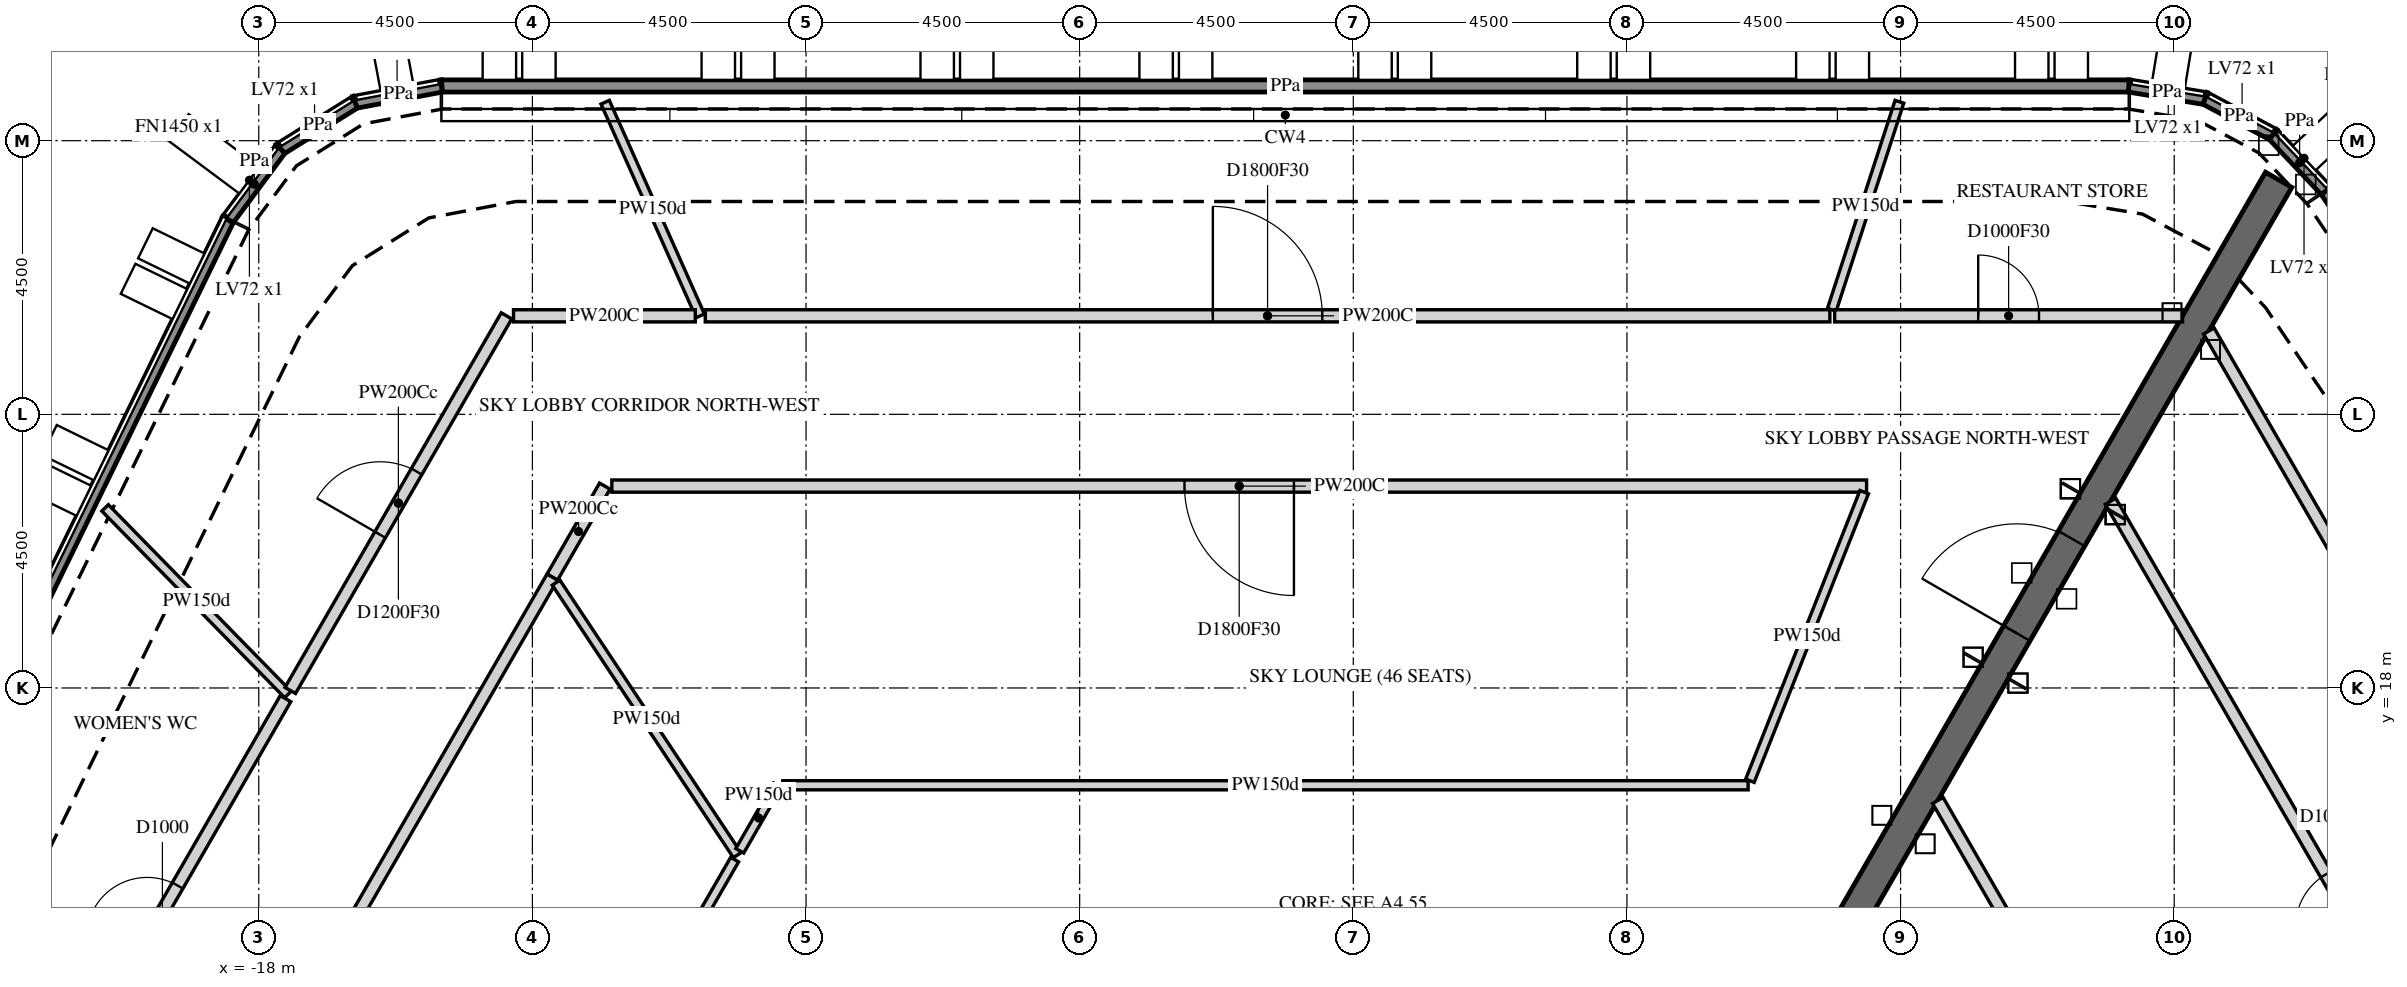
"""IFC4 building model, lengths in metres.
Left out: names, types, materials, properties, quantities, classifications, styles, units other than length and angle.
Written with IfcOpenShell. Run it as: python <this file> out.ifc"""

import sys

from ifc_helpers import new_model, si_unit, direction, frame, frame_2d, origin, place, context, subcontext, project, spatial, polyline, rectangle, outline, extrude, element, fill, save


model = new_model("IFC4")
c1 = context("Model", 3, precision=1e-05, world=origin(), true_north=direction((0.0, 1.0)))
c2 = subcontext(c1, "Body", "Model", "MODEL_VIEW")
j1 = project(units=[si_unit("LENGTHUNIT", "METRE"), si_unit("PLANEANGLEUNIT", "RADIAN")], contexts=[c1])
p1 = place(None, origin())
s1 = spatial("IfcSite", under=j1, at=p1, CompositionType="ELEMENT")
p2 = place(p1, origin())
s2 = spatial("IfcBuilding", under=s1, at=p2, CompositionType="ELEMENT")
p3 = place(p2, frame((0.0, 0.0, 250.2)))
s3 = spatial("IfcBuildingStorey", under=s2, at=p3, CompositionType="ELEMENT", Elevation=250.2)
p4 = place(p3, frame((12.753, 27.9, 5.7), z_axis=(0.0, 0.0, 1.0), x_axis=(0.9867748983, -0.162096576412, 0.0)))
e1 = element("IfcWall", 1, at=p4, inside=s3, PredefinedType="PARAPET", context=c2, shape_type="SweptSolid", body=[
    extrude(outline(polyline([(0.008, -0.1), (1.256, -0.1), (1.289, 0.1), (-0.008, 0.1), (0.008, -0.1)])), origin(), (0.0, 0.0, 1.0), 1.1),
])
p5 = place(p3, frame((14.009, 27.694, 5.7), z_axis=(0.0, 0.0, 1.0), x_axis=(0.882950708751, -0.469465702598, 0.0)))
e2 = element("IfcWall", 2, at=p5, inside=s3, PredefinedType="PARAPET", context=c2, shape_type="SweptSolid", body=[
    extrude(outline(polyline([(0.016, -0.1), (1.248, -0.1), (1.281, 0.1), (-0.016, 0.1), (0.016, -0.1)])), origin(), (0.0, 0.0, 1.0), 1.1),
])
p6 = place(p3, frame((15.125, 27.1, 5.7), z_axis=(0.0, 0.0, 1.0), x_axis=(0.686184039693, -0.727427978339, 0.0)))
e3 = element("IfcWall", 3, at=p6, inside=s3, PredefinedType="PARAPET", context=c2, shape_type="SweptSolid", body=[
    extrude(outline(polyline([(0.016, -0.1), (1.265, -0.1), (1.281, 0.1), (-0.016, 0.1), (0.016, -0.1)])), origin(), (0.0, 0.0, 1.0), 1.1),
])
p7 = place(p3, frame((15.999, 26.174, 5.7), z_axis=(0.0, 0.0, 1.0), x_axis=(0.559192735444, -0.82903768589, 0.0)))
e4 = element("IfcWall", 4, at=p7, inside=s3, PredefinedType="PARAPET", context=c2, shape_type="SweptSolid", body=[
    extrude(outline(polyline([(0.008, -0.1), (27.731, -0.1), (27.75, 0.1), (-0.008, 0.1), (0.008, -0.1)])), origin(), (0.0, 0.0, 1.0), 1.1),
])
p8 = place(p3, frame((-30.667, 0.768, 5.7), z_axis=(0.0, 0.0, 1.0), x_axis=(0.43836623679, 0.898796441049, 0.0)))
e5 = element("IfcWall", 5, at=p8, inside=s3, PredefinedType="PARAPET", context=c2, shape_type="SweptSolid", body=[
    extrude(outline(polyline([(0.008, -0.1), (27.731, -0.1), (27.75, 0.1), (-0.008, 0.1), (0.008, -0.1)])), origin(), (0.0, 0.0, 1.0), 1.1),
])
p9 = place(p3, frame((-18.506, 25.701, 5.7), z_axis=(0.0, 0.0, 1.0), x_axis=(0.597118923952, 0.802152722777, 0.0)))
e6 = element("IfcWall", 6, at=p9, inside=s3, PredefinedType="PARAPET", context=c2, shape_type="SweptSolid", body=[
    extrude(outline(polyline([(0.009, -0.1), (1.434, -0.1), (1.471, 0.1), (-0.009, 0.1), (0.009, -0.1)])), origin(), (0.0, 0.0, 1.0), 1.1),
])
p10 = place(p3, frame((-17.639, 26.866, 5.7), z_axis=(0.0, 0.0, 1.0), x_axis=(0.848083831846, 0.529862070884, 0.0)))
e7 = element("IfcWall", 7, at=p10, inside=s3, PredefinedType="PARAPET", context=c2, shape_type="SweptSolid", body=[
    extrude(outline(polyline([(0.019, -0.1), (1.424, -0.1), (1.462, 0.1), (-0.019, 0.1), (0.019, -0.1)])), origin(), (0.0, 0.0, 1.0), 1.1),
])
p11 = place(p3, frame((-16.415, 27.631, 5.7), z_axis=(0.0, 0.0, 1.0), x_axis=(0.982729187844, 0.185049570005, 0.0)))
e8 = element("IfcWall", 8, at=p11, inside=s3, PredefinedType="PARAPET", context=c2, shape_type="SweptSolid", body=[
    extrude(outline(polyline([(0.019, -0.1), (1.443, -0.1), (1.462, 0.1), (-0.019, 0.1), (0.019, -0.1)])), origin(), (0.0, 0.0, 1.0), 1.1),
])
p12 = place(p3, frame((-14.988, 27.9, 5.7), z_axis=(0.0, 0.0, 1.0), x_axis=(1.0, 0.0, 0.0)))
e9 = element("IfcWall", 9, at=p12, inside=s3, PredefinedType="PARAPET", context=c2, shape_type="SweptSolid", body=[
    extrude(outline(polyline([(0.009, -0.1), (27.732, -0.1), (27.749, 0.1), (-0.009, 0.1), (0.009, -0.1)])), origin(), (0.0, 0.0, 1.0), 1.1),
])
p13 = place(p3, frame((7.506, 13.0, -0.3), z_axis=(0.0, 0.0, 1.0), x_axis=(0.499988271576, 0.866032175087, 0.0)))
e10 = element("IfcWall", 10, at=p13, inside=s3, PredefinedType="SHEAR", context=c2, shape_type="SweptSolid", body=[
    extrude(rectangle(XDim=15.424, YDim=0.5, at=frame_2d((7.712, 0.0))), origin(), (0.0, 0.0, 1.0), 5.8),
])
p14 = place(p13, frame((6.812, 0.0, 0.3)))
e11 = element("IfcOpeningElement", 11, at=p14, cuts=e10, PredefinedType="OPENING", context=c2, shape_type="SweptSolid", body=[
    extrude(rectangle(XDim=1.8, YDim=2.4, at=frame_2d((0.9, 1.2))), frame((0.0, 0.26, 0.0), z_axis=(0.0, -1.0, 0.0), x_axis=(1.0, 0.0, 0.0)), (0.0, 0.0, 1.0), 0.52),
])
p15 = place(p3, frame((-13.172, 19.825, 0.0), z_axis=(0.0, 0.0, 1.0), x_axis=(-0.499999503755, -0.866025690291, 0.0)))
e12 = element("IfcWall", 12, at=p15, inside=s3, PredefinedType="PARTITIONING", context=c2, shape_type="SweptSolid", body=[
    extrude(rectangle(XDim=18.943, YDim=0.2, at=frame_2d((9.471, 0.0))), origin(), (0.0, 0.0, 1.0), 5.5),
])
p16 = place(p15, frame((8.572, 0.0, 0.0)))
e13 = element("IfcOpeningElement", 13, at=p16, cuts=e12, PredefinedType="OPENING", context=c2, shape_type="SweptSolid", body=[
    extrude(rectangle(XDim=1.8, YDim=2.1, at=frame_2d((0.9, 1.05))), frame((0.0, 0.11, 0.0), z_axis=(0.0, -1.0, 0.0), x_axis=(1.0, 0.0, 0.0)), (0.0, 0.0, 1.0), 0.22),
])
p17 = place(p3, frame((-20.527, 20.962, 0.0), z_axis=(0.0, 0.0, 1.0), x_axis=(0.699623583843, -0.714511610074, 0.0)))
e14 = element("IfcWall", 14, at=p17, inside=s3, PredefinedType="PARTITIONING", context=c2, shape_type="SweptSolid", body=[
    extrude(rectangle(XDim=4.296, YDim=0.15, at=frame_2d((2.148, 0.0))), origin(), (0.0, 0.0, 1.0), 5.5),
])
p18 = place(p3, frame((-21.609, 10.811, 0.0), z_axis=(0.0, 0.0, 1.0), x_axis=(0.500032982845, 0.866006360293, 0.0)))
e15 = element("IfcWall", 15, at=p18, inside=s3, PredefinedType="PARTITIONING", context=c2, shape_type="SweptSolid", body=[
    extrude(rectangle(XDim=8.099, YDim=0.2, at=frame_2d((4.049, 0.0))), origin(), (0.0, 0.0, 1.0), 5.5),
])
p19 = place(p18, frame((3.549, 0.0, 0.0)))
e16 = element("IfcOpeningElement", 16, at=p19, cuts=e15, PredefinedType="OPENING", context=c2, shape_type="SweptSolid", body=[
    extrude(rectangle(XDim=1.0, YDim=2.1, at=frame_2d((0.5, 1.05))), frame((0.0, 0.11, 0.0), z_axis=(0.0, -1.0, 0.0), x_axis=(1.0, 0.0, 0.0)), (0.0, 0.0, 1.0), 0.22),
])
p20 = place(p3, frame((-17.482, 17.959, 0.0), z_axis=(0.0, 0.0, 1.0), x_axis=(0.499926463787, 0.866067855774, 0.0)))
e17 = element("IfcWall", 17, at=p20, inside=s3, PredefinedType="PARTITIONING", context=c2, shape_type="SweptSolid", body=[
    extrude(rectangle(XDim=7.113, YDim=0.2, at=frame_2d((3.557, 0.0))), origin(), (0.0, 0.0, 1.0), 4.573),
])
p21 = place(p20, frame((2.957, 0.0, 0.0)))
e18 = element("IfcOpeningElement", 18, at=p21, cuts=e17, PredefinedType="OPENING", context=c2, shape_type="SweptSolid", body=[
    extrude(rectangle(XDim=1.2, YDim=2.1, at=frame_2d((0.6, 1.05))), frame((0.0, 0.11, 0.0), z_axis=(0.0, -1.0, 0.0), x_axis=(1.0, 0.0, 0.0)), (0.0, 0.0, 1.0), 0.22),
])
p22 = place(p3, frame((-13.172, 19.825, 0.0), z_axis=(0.0, 0.0, 1.0), x_axis=(0.49992648901, 0.866067841215, 0.0)))
e19 = element("IfcWall", 19, at=p22, inside=s3, PredefinedType="PARTITIONING", context=c2, shape_type="SweptSolid", body=[
    extrude(rectangle(XDim=1.726, YDim=0.2, at=frame_2d((0.863, 0.0))), origin(), (0.0, 0.0, 1.0), 4.573),
])
p23 = place(p3, frame((-13.11, 19.732, 0.0), z_axis=(0.0, 0.0, 1.0), x_axis=(0.553422205017, -0.83290087225, 0.0)))
e20 = element("IfcWall", 20, at=p23, inside=s3, PredefinedType="PARTITIONING", context=c2, shape_type="SweptSolid", body=[
    extrude(rectangle(XDim=5.381, YDim=0.15, at=frame_2d((2.69, 0.0))), origin(), (0.0, 0.0, 1.0), 5.5),
])
p24 = place(p3, frame((8.441, 21.32, 0.0), z_axis=(0.0, 0.0, 1.0), x_axis=(-1.0, 0.0, 0.0)))
e21 = element("IfcWall", 21, at=p24, inside=s3, PredefinedType="PARTITIONING", context=c2, shape_type="SweptSolid", body=[
    extrude(rectangle(XDim=20.635, YDim=0.2, at=frame_2d((10.317, 0.0))), origin(), (0.0, 0.0, 1.0), 5.5),
])
p25 = place(p24, frame((9.417, 0.0, 0.0)))
e22 = element("IfcOpeningElement", 22, at=p25, cuts=e21, PredefinedType="OPENING", context=c2, shape_type="SweptSolid", body=[
    extrude(rectangle(XDim=1.8, YDim=2.1, at=frame_2d((0.9, 1.05))), frame((0.0, 0.11, 0.0), z_axis=(0.0, -1.0, 0.0), x_axis=(1.0, 0.0, 0.0)), (0.0, 0.0, 1.0), 0.22),
])
p26 = place(p3, frame((-12.303, 27.633, 0.0), z_axis=(0.0, 0.0, 1.0), x_axis=(0.406845245806, -0.913497096856, 0.0)))
e23 = element("IfcWall", 23, at=p26, inside=s3, PredefinedType="PARTITIONING", context=c2, shape_type="SweptSolid", body=[
    extrude(rectangle(XDim=3.845, YDim=0.15, at=frame_2d((1.923, 0.0))), origin(), (0.0, 0.0, 1.0), 5.5),
])
p27 = place(p3, frame((-10.821, 24.12, 0.0), z_axis=(0.0, 0.0, 1.0), x_axis=(-1.0, 0.0, 0.0)))
e24 = element("IfcWall", 24, at=p27, inside=s3, PredefinedType="PARTITIONING", context=c2, shape_type="SweptSolid", body=[
    extrude(rectangle(XDim=2.99, YDim=0.2, at=frame_2d((1.495, 0.0))), origin(), (0.0, 0.0, 1.0), 5.5),
])
p28 = place(p3, frame((-10.174, 15.177, 0.0), z_axis=(0.0, 0.0, 1.0), x_axis=(-0.500018949701, -0.866014462893, 0.0)))
e25 = element("IfcWall", 25, at=p28, inside=s3, PredefinedType="PARTITIONING", context=c2, shape_type="SweptSolid", body=[
    extrude(rectangle(XDim=14.469, YDim=0.15, at=frame_2d((7.235, 0.0))), origin(), (0.0, 0.0, 1.0), 5.5),
])
p29 = place(p3, frame((-9.469, 16.4, 0.0), z_axis=(0.0, 0.0, 1.0), x_axis=(-0.499433504563, -0.866352223128, 0.0)))
e26 = element("IfcWall", 26, at=p29, inside=s3, PredefinedType="PARTITIONING", context=c2, shape_type="SweptSolid", body=[
    extrude(rectangle(XDim=1.244, YDim=0.15, at=frame_2d((0.622, 0.0))), origin(), (0.0, 0.0, 1.0), 5.5),
])
p30 = place(p3, frame((6.493, 16.4, 0.0), z_axis=(0.0, 0.0, 1.0), x_axis=(-1.0, 0.0, 0.0)))
e27 = element("IfcWall", 27, at=p30, inside=s3, PredefinedType="PARTITIONING", context=c2, shape_type="SweptSolid", body=[
    extrude(rectangle(XDim=15.875, YDim=0.15, at=frame_2d((7.938, 0.0))), origin(), (0.0, 0.0, 1.0), 5.5),
])
p31 = place(p3, frame((-10.657, 24.12, 0.0), z_axis=(0.0, 0.0, 1.0), x_axis=(1.0, 0.0, 0.0)))
e28 = element("IfcWall", 28, at=p31, inside=s3, PredefinedType="PARTITIONING", context=c2, shape_type="SweptSolid", body=[
    extrude(rectangle(XDim=18.494, YDim=0.2, at=frame_2d((9.247, 0.0))), origin(), (0.0, 0.0, 1.0), 5.5),
])
p32 = place(p31, frame((8.347, 0.0, 0.0)))
e29 = element("IfcOpeningElement", 29, at=p32, cuts=e28, PredefinedType="OPENING", context=c2, shape_type="SweptSolid", body=[
    extrude(rectangle(XDim=1.8, YDim=2.1, at=frame_2d((0.9, 1.05))), frame((0.0, 0.11, 0.0), z_axis=(0.0, -1.0, 0.0), x_axis=(1.0, 0.0, 0.0)), (0.0, 0.0, 1.0), 0.22),
])
p33 = place(p3, frame((8.401, 21.22, 0.0), z_axis=(0.0, 0.0, 1.0), x_axis=(-0.368130307477, -0.929774207384, 0.0)))
e30 = element("IfcWall", 30, at=p33, inside=s3, PredefinedType="PARTITIONING", context=c2, shape_type="SweptSolid", body=[
    extrude(rectangle(XDim=5.103, YDim=0.15, at=frame_2d((2.552, 0.0))), origin(), (0.0, 0.0, 1.0), 5.5),
])
p34 = place(p3, frame((8.981, 27.64, 0.0), z_axis=(0.0, 0.0, 1.0), x_axis=(-0.309029274021, -0.951052526309, 0.0)))
e31 = element("IfcWall", 31, at=p34, inside=s3, PredefinedType="PARTITIONING", context=c2, shape_type="SweptSolid", body=[
    extrude(rectangle(XDim=3.596, YDim=0.15, at=frame_2d((1.798, 0.0))), origin(), (0.0, 0.0, 1.0), 5.5),
])
p35 = place(p3, frame((20.038, 7.934, 0.0), z_axis=(0.0, 0.0, 1.0), x_axis=(-0.500056356876, 0.865992863682, 0.0)))
e32 = element("IfcWall", 32, at=p35, inside=s3, PredefinedType="PARTITIONING", context=c2, shape_type="SweptSolid", body=[
    extrude(rectangle(XDim=15.169, YDim=0.2, at=frame_2d((7.584, 0.0))), origin(), (0.0, 0.0, 1.0), 5.5),
])
p36 = place(p35, frame((7.084, 0.0, 0.0)))
e33 = element("IfcOpeningElement", 33, at=p36, cuts=e32, PredefinedType="OPENING", context=c2, shape_type="SweptSolid", body=[
    extrude(rectangle(XDim=1.0, YDim=2.1, at=frame_2d((0.5, 1.05))), frame((0.0, 0.11, 0.0), z_axis=(0.0, -1.0, 0.0), x_axis=(1.0, 0.0, 0.0)), (0.0, 0.0, 1.0), 0.22),
])
p37 = place(p3, frame((7.916, 24.12, 0.0), z_axis=(0.0, 0.0, 1.0), x_axis=(1.0, 0.0, 0.0)))
e34 = element("IfcWall", 34, at=p37, inside=s3, PredefinedType="PARTITIONING", context=c2, shape_type="SweptSolid", body=[
    extrude(rectangle(XDim=5.721, YDim=0.2, at=frame_2d((2.861, 0.0))), origin(), (0.0, 0.0, 1.0), 5.5),
])
p38 = place(p37, frame((2.361, 0.0, 0.0)))
e35 = element("IfcOpeningElement", 35, at=p38, cuts=e34, PredefinedType="OPENING", context=c2, shape_type="SweptSolid", body=[
    extrude(rectangle(XDim=1.0, YDim=2.1, at=frame_2d((0.5, 1.05))), frame((0.0, 0.11, 0.0), z_axis=(0.0, -1.0, 0.0), x_axis=(1.0, 0.0, 0.0)), (0.0, 0.0, 1.0), 0.22),
])
p39 = place(p3, frame((15.414, 6.103, 0.0), z_axis=(0.0, 0.0, 1.0), x_axis=(-0.50002969912, 0.86600825631, 0.0)))
e36 = element("IfcWall", 36, at=p39, inside=s3, PredefinedType="PARTITIONING", context=c2, shape_type="SweptSolid", body=[
    extrude(rectangle(XDim=11.601, YDim=0.2, at=frame_2d((5.801, 0.0))), origin(), (0.0, 0.0, 1.0), 5.5),
])
p40 = place(p3, frame((14.07, 23.87, 0.0), z_axis=(0.0, 0.0, 1.0), x_axis=(0.500014285048, -0.866017156151, 0.0)))
e37 = element("IfcWall", 37, at=p40, inside=s3, PredefinedType="PARTITIONING", context=c2, shape_type="SweptSolid", body=[
    extrude(rectangle(XDim=13.131, YDim=0.2, at=frame_2d((6.566, 0.0))), origin(), (0.0, 0.0, 1.0), 5.5),
])
p41 = place(p40, frame((6.066, 0.0, 0.0)))
e38 = element("IfcOpeningElement", 38, at=p41, cuts=e37, PredefinedType="OPENING", context=c2, shape_type="SweptSolid", body=[
    extrude(rectangle(XDim=1.0, YDim=2.1, at=frame_2d((0.5, 1.05))), frame((0.0, 0.11, 0.0), z_axis=(0.0, -1.0, 0.0), x_axis=(1.0, 0.0, 0.0)), (0.0, 0.0, 1.0), 0.22),
])
p42 = place(p14, origin())
e39 = element("IfcDoor", 39, at=p42, inside=s3, OperationType="DOUBLE_DOOR_SINGLE_SWING", PredefinedType="DOOR", context=c2, shape_type="SweptSolid", body=[
    extrude(rectangle(XDim=1.8, YDim=2.4, at=frame_2d((0.9, 1.2))), frame((0.0, 0.025, 0.0), z_axis=(0.0, -1.0, 0.0), x_axis=(1.0, 0.0, 0.0)), (0.0, 0.0, 1.0), 0.05),
])
fill(e11, e39)
p43 = place(p19, origin())
e40 = element("IfcDoor", 40, at=p43, inside=s3, OperationType="SINGLE_SWING_RIGHT", PredefinedType="DOOR", context=c2, shape_type="SweptSolid", body=[
    extrude(rectangle(XDim=1.0, YDim=2.1, at=frame_2d((0.5, 1.05))), frame((0.0, 0.025, 0.0), z_axis=(0.0, -1.0, 0.0), x_axis=(1.0, 0.0, 0.0)), (0.0, 0.0, 1.0), 0.05),
])
fill(e16, e40)
p44 = place(p21, origin())
e41 = element("IfcDoor", 41, at=p44, inside=s3, OperationType="SINGLE_SWING_RIGHT", PredefinedType="DOOR", context=c2, shape_type="SweptSolid", body=[
    extrude(rectangle(XDim=1.2, YDim=2.1, at=frame_2d((0.6, 1.05))), frame((0.0, 0.025, 0.0), z_axis=(0.0, -1.0, 0.0), x_axis=(1.0, 0.0, 0.0)), (0.0, 0.0, 1.0), 0.05),
])
fill(e18, e41)
p45 = place(p25, origin())
e42 = element("IfcDoor", 42, at=p45, inside=s3, OperationType="DOUBLE_DOOR_SINGLE_SWING", PredefinedType="DOOR", context=c2, shape_type="SweptSolid", body=[
    extrude(rectangle(XDim=1.8, YDim=2.1, at=frame_2d((0.9, 1.05))), frame((0.0, 0.025, 0.0), z_axis=(0.0, -1.0, 0.0), x_axis=(1.0, 0.0, 0.0)), (0.0, 0.0, 1.0), 0.05),
])
fill(e22, e42)
p46 = place(p32, origin())
e43 = element("IfcDoor", 43, at=p46, inside=s3, OperationType="DOUBLE_DOOR_SINGLE_SWING", PredefinedType="DOOR", context=c2, shape_type="SweptSolid", body=[
    extrude(rectangle(XDim=1.8, YDim=2.1, at=frame_2d((0.9, 1.05))), frame((0.0, 0.025, 0.0), z_axis=(0.0, -1.0, 0.0), x_axis=(1.0, 0.0, 0.0)), (0.0, 0.0, 1.0), 0.05),
])
fill(e29, e43)
p47 = place(p36, origin())
e44 = element("IfcDoor", 44, at=p47, inside=s3, OperationType="SINGLE_SWING_LEFT", PredefinedType="DOOR", context=c2, shape_type="SweptSolid", body=[
    extrude(rectangle(XDim=1.0, YDim=2.1, at=frame_2d((0.5, 1.05))), frame((0.0, 0.025, 0.0), z_axis=(0.0, -1.0, 0.0), x_axis=(1.0, 0.0, 0.0)), (0.0, 0.0, 1.0), 0.05),
])
fill(e33, e44)
p48 = place(p38, origin())
e45 = element("IfcDoor", 45, at=p48, inside=s3, OperationType="SINGLE_SWING_RIGHT", PredefinedType="DOOR", context=c2, shape_type="SweptSolid", body=[
    extrude(rectangle(XDim=1.0, YDim=2.1, at=frame_2d((0.5, 1.05))), frame((0.0, 0.025, 0.0), z_axis=(0.0, -1.0, 0.0), x_axis=(1.0, 0.0, 0.0)), (0.0, 0.0, 1.0), 0.05),
])
fill(e35, e45)
save(model, sys.argv[1])
